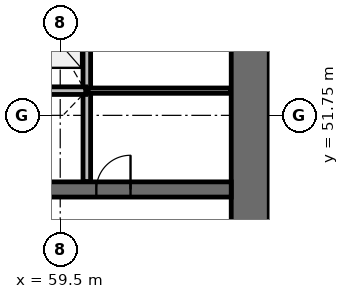
"""IFC4 building model, lengths in metres.
Left out: names, types, materials, properties, quantities, classifications, styles, units other than length and angle.
Written with IfcOpenShell. Run it as: python <this file> out.ifc"""

import sys

from ifc_helpers import new_model, si_unit, direction, frame, frame_2d, origin, place, context, subcontext, project, spatial, rectangle, extrude, source, transform, mapped, element, fill, save


model = new_model("IFC4")
c1 = context("Model", 3, precision=1e-05, world=origin(), true_north=direction((0.0, 1.0)))
c2 = subcontext(c1, "Body", "Model", "MODEL_VIEW")
j1 = project(units=[si_unit("LENGTHUNIT", "METRE"), si_unit("PLANEANGLEUNIT", "RADIAN")], contexts=[c1])
p1 = place(None, origin())
s1 = spatial("IfcSite", under=j1, at=p1, CompositionType="ELEMENT")
p2 = place(p1, origin())
s2 = spatial("IfcBuilding", under=s1, at=p2, CompositionType="ELEMENT")
p3 = place(p2, frame((0.0, 0.0, 5.0)))
s3 = spatial("IfcBuildingStorey", under=s2, at=p3, CompositionType="ELEMENT", Elevation=5.0)
p4 = place(p3, frame((64.5, 38.0, 0.0), z_axis=(0.0, 0.0, 1.0), x_axis=(0.0, 1.0, 0.0)))
e1 = element("IfcWall", 1, at=p4, inside=s3, PredefinedType="SHEAR", context=c2, shape_type="SweptSolid", body=[
    extrude(rectangle(XDim=20.0, YDim=1.0, at=frame_2d((10.0, 0.0))), origin(), (0.0, 0.0, 1.0), 4.4),
])
p5 = place(p4, frame((9.1, 0.0, 0.0)))
e2 = element("IfcOpeningElement", 2, at=p5, cuts=e1, PredefinedType="OPENING", context=c2, shape_type="SweptSolid", body=[
    extrude(rectangle(XDim=1.8, YDim=2.1, at=frame_2d((0.9, 1.05))), frame((0.0, 0.51, 0.0), z_axis=(0.0, -1.0, 0.0), x_axis=(1.0, 0.0, 0.0)), (0.0, 0.0, 1.0), 1.02),
])
p6 = place(p3, frame((40.0, 49.8, 0.0), z_axis=(0.0, 0.0, 1.0), x_axis=(1.0, 0.0, 0.0)))
e3 = element("IfcWall", 3, at=p6, inside=s3, PredefinedType="SHEAR", context=c2, shape_type="SweptSolid", body=[
    extrude(rectangle(XDim=24.0, YDim=0.4, at=frame_2d((12.0, 0.0))), origin(), (0.0, 0.0, 1.0), 4.4),
])
p7 = place(p6, frame((4.5, 0.0, 0.0)))
e4 = element("IfcOpeningElement", 4, at=p7, cuts=e3, PredefinedType="OPENING", context=c2, shape_type="SweptSolid", body=[
    extrude(rectangle(XDim=1.1, YDim=2.1, at=frame_2d((0.55, 1.05))), frame((0.0, 0.21, 0.0), z_axis=(0.0, -1.0, 0.0), x_axis=(1.0, 0.0, 0.0)), (0.0, 0.0, 1.0), 0.42),
])
p8 = place(p6, frame((7.0, 0.0, 0.0)))
e5 = element("IfcOpeningElement", 5, at=p8, cuts=e3, PredefinedType="OPENING", context=c2, shape_type="SweptSolid", body=[
    extrude(rectangle(XDim=1.1, YDim=2.1, at=frame_2d((0.55, 1.05))), frame((0.0, 0.21, 0.0), z_axis=(0.0, -1.0, 0.0), x_axis=(1.0, 0.0, 0.0)), (0.0, 0.0, 1.0), 0.42),
])
p9 = place(p6, frame((9.5, 0.0, 0.0)))
e6 = element("IfcOpeningElement", 6, at=p9, cuts=e3, PredefinedType="OPENING", context=c2, shape_type="SweptSolid", body=[
    extrude(rectangle(XDim=1.1, YDim=2.1, at=frame_2d((0.55, 1.05))), frame((0.0, 0.21, 0.0), z_axis=(0.0, -1.0, 0.0), x_axis=(1.0, 0.0, 0.0)), (0.0, 0.0, 1.0), 0.42),
])
p10 = place(p6, frame((0.9, 0.0, 0.0)))
e7 = element("IfcOpeningElement", 7, at=p10, cuts=e3, PredefinedType="OPENING", context=c2, shape_type="SweptSolid", body=[
    extrude(rectangle(XDim=1.8, YDim=2.4, at=frame_2d((0.9, 1.2))), frame((0.0, 0.21, 0.0), z_axis=(0.0, -1.0, 0.0), x_axis=(1.0, 0.0, 0.0)), (0.0, 0.0, 1.0), 0.42),
])
p11 = place(p6, frame((20.45, 0.0, 0.0)))
e8 = element("IfcOpeningElement", 8, at=p11, cuts=e3, PredefinedType="OPENING", context=c2, shape_type="SweptSolid", body=[
    extrude(rectangle(XDim=0.9, YDim=2.1, at=frame_2d((0.45, 1.05))), frame((0.0, 0.21, 0.0), z_axis=(0.0, -1.0, 0.0), x_axis=(1.0, 0.0, 0.0)), (0.0, 0.0, 1.0), 0.42),
])
p12 = place(p6, frame((11.65, 0.0, 0.0)))
e9 = element("IfcOpeningElement", 9, at=p12, cuts=e3, PredefinedType="OPENING", context=c2, shape_type="SweptSolid", body=[
    extrude(rectangle(XDim=0.9, YDim=2.1, at=frame_2d((0.45, 1.05))), frame((0.0, 0.21, 0.0), z_axis=(0.0, -1.0, 0.0), x_axis=(1.0, 0.0, 0.0)), (0.0, 0.0, 1.0), 0.42),
])
p13 = place(p3, frame((60.2, 52.4, 0.0), z_axis=(0.0, 0.0, 1.0), x_axis=(0.0, 1.0, 0.0)))
e10 = element("IfcWall", 10, at=p13, inside=s3, PredefinedType="SOLIDWALL", context=c2, shape_type="SweptSolid", body=[
    extrude(rectangle(XDim=2.8, YDim=0.2, at=frame_2d((1.4, 0.0))), origin(), (0.0, 0.0, 1.0), 4.05),
])
p14 = place(p3, frame((60.2, 50.01, 0.0), z_axis=(0.0, 0.0, 1.0), x_axis=(0.0, 1.0, 0.0)))
e11 = element("IfcWall", 11, at=p14, inside=s3, PredefinedType="SOLIDWALL", context=c2, shape_type="SweptSolid", body=[
    extrude(rectangle(XDim=2.36, YDim=0.2, at=frame_2d((1.18, 0.0))), origin(), (0.0, 0.0, 1.0), 4.05),
])
p15 = place(p3, frame((60.17, 52.4, 0.0), z_axis=(0.0, 0.0, 1.0), x_axis=(-1.0, 0.0, 0.0)))
e12 = element("IfcWall", 12, at=p15, inside=s3, PredefinedType="SOLIDWALL", context=c2, shape_type="SweptSolid", body=[
    extrude(rectangle(XDim=1.64, YDim=0.2, at=frame_2d((0.82, 0.0))), origin(), (0.0, 0.0, 1.0), 4.05),
])
p16 = place(p3, frame((63.98, 52.4, 0.0), z_axis=(0.0, 0.0, 1.0), x_axis=(-1.0, 0.0, 0.0)))
e13 = element("IfcWall", 13, at=p16, inside=s3, PredefinedType="PARTITIONING", context=c2, shape_type="SweptSolid", body=[
    extrude(rectangle(XDim=3.75, YDim=0.14, at=frame_2d((1.875, 0.0))), origin(), (0.0, 0.0, 1.0), 3.25),
])
m1 = source(origin(), c2, "Body", "SweptSolid", [
    extrude(rectangle(XDim=0.9, YDim=2.1, at=frame_2d((0.45, 1.05))), frame((0.0, 0.025, 0.0), z_axis=(0.0, -1.0, 0.0), x_axis=(1.0, 0.0, 0.0)), (0.0, 0.0, 1.0), 0.05),
])
p17 = place(p11, origin())
e14 = element("IfcDoor", 14, at=p17, inside=s3, OperationType="SINGLE_SWING_RIGHT", PredefinedType="DOOR", context=c2, shape_type="MappedRepresentation", body=[
    mapped(m1, transform((0.0, 0.0, 0.0), scale=1.0)),
])
fill(e8, e14)
save(model, sys.argv[1])
